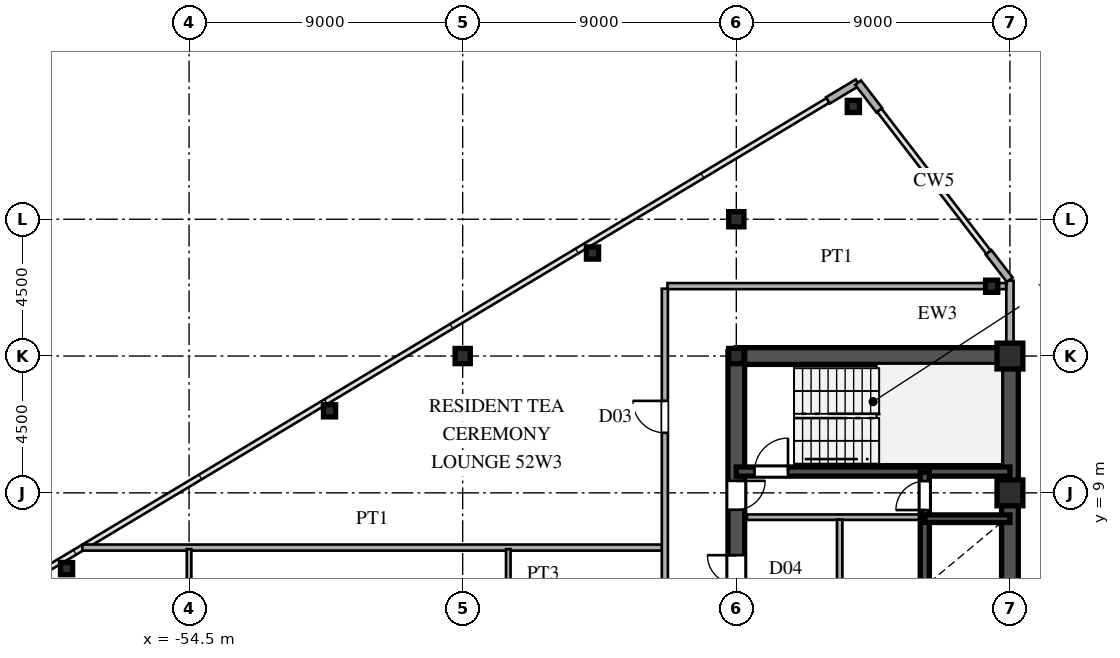
"""IFC4 building model, lengths in metres.
Left out: names, types, materials, properties, quantities, classifications, styles, units other than length and angle.
Written with IfcOpenShell. Run it as: python <this file> out.ifc"""

import sys

from ifc_helpers import new_model, si_unit, direction, frame, frame_2d, origin, origin_2d, place, context, subcontext, project, spatial, rectangle, hollow_rectangle, i_section, extrude, source, transform, mapped, element, fill, save


model = new_model("IFC4")
c1 = context("Model", 3, precision=1e-05, world=origin(), true_north=direction((0.0, 1.0)))
c2 = subcontext(c1, "Body", "Model", "MODEL_VIEW")
j1 = project(units=[si_unit("LENGTHUNIT", "METRE"), si_unit("PLANEANGLEUNIT", "RADIAN")], contexts=[c1])
p1 = place(None, origin())
s1 = spatial("IfcSite", under=j1, at=p1, CompositionType="ELEMENT")
p2 = place(p1, origin())
s2 = spatial("IfcBuilding", under=s1, at=p2, CompositionType="ELEMENT")
p3 = place(p2, frame((0.0, 0.0, 195.9)))
s3 = spatial("IfcBuildingStorey", under=s2, at=p3, CompositionType="ELEMENT", Elevation=195.9)
m1 = source(origin(), c2, "Body", "SweptSolid", [
    extrude(hollow_rectangle(XDim=0.85, YDim=0.85, WallThickness=0.036, at=origin_2d()), origin(), (0.0, 0.0, 1.0), 3.6),
])
for number, where, z_axis, x_axis in (
    (1, (-27.5, 9.0, 0.0), (0.0, 0.0, 1.0), (1.0, 0.0, 0.0)),
    (2, (-27.5, 13.5, 0.0), (0.0, 0.0, 1.0), (1.0, 0.0, 0.0)),
):
    element("IfcColumn", number, at=place(p3, frame(where, z_axis=z_axis, x_axis=x_axis)), inside=s3, PredefinedType="COLUMN", context=c2, shape_type="MappedRepresentation", body=[
        mapped(m1, transform((0.0, 0.0, 0.0), scale=1.0)),
    ])
m2 = source(origin(), c2, "Body", "SweptSolid", [
    extrude(i_section(OverallWidth=0.5, OverallDepth=0.5, WebThickness=0.02, FlangeThickness=0.032, at=origin_2d()), origin(), (0.0, 0.0, 1.0), 3.6),
])
for number, where, z_axis, x_axis in (
    (3, (-36.5, 13.5, 0.0), (0.0, 0.0, 1.0), (1.0, 0.0, 0.0)),
    (4, (-36.5, 18.0, 0.0), (0.0, 0.0, 1.0), (1.0, 0.0, 0.0)),
    (5, (-45.5, 13.5, 0.0), (0.0, 0.0, 1.0), (1.0, 0.0, 0.0)),
):
    element("IfcColumn", number, at=place(p3, frame(where, z_axis=z_axis, x_axis=x_axis)), inside=s3, PredefinedType="COLUMN", context=c2, shape_type="MappedRepresentation", body=[
        mapped(m2, transform((0.0, 0.0, 0.0), scale=1.0)),
    ])
m3 = source(origin(), c2, "Body", "SweptSolid", [
    extrude(hollow_rectangle(XDim=0.4, YDim=0.4, WallThickness=0.016, at=origin_2d()), origin(), (0.0, 0.0, 1.0), 3.6),
])
for number, where, z_axis, x_axis in (
    (6, (-28.1, 15.796, 0.0), (0.0, 0.0, 1.0), (1.0, 0.0, 0.0)),
    (7, (-32.65, 21.71, 0.0), (0.0, 0.0, 1.0), (1.0, 0.0, 0.0)),
    (8, (-41.23, 16.889, 0.0), (0.0, 0.0, 1.0), (1.0, 0.0, 0.0)),
    (9, (-49.88, 11.699, 0.0), (0.0, 0.0, 1.0), (1.0, 0.0, 0.0)),
    (10, (-58.53, 6.509, 0.0), (0.0, 0.0, 1.0), (1.0, 0.0, 0.0)),
):
    element("IfcColumn", number, at=place(p3, frame(where, z_axis=z_axis, x_axis=x_axis)), inside=s3, PredefinedType="COLUMN", context=c2, shape_type="MappedRepresentation", body=[
        mapped(m3, transform((0.0, 0.0, 0.0), scale=1.0)),
    ])
p4 = place(p3, frame((-27.5, 13.78, 0.0), z_axis=(0.0, 0.0, 1.0), x_axis=(0.0, 1.0, 0.0)))
e11 = element("IfcWall", 11, at=p4, inside=s3, PredefinedType="SOLIDWALL", context=c2, shape_type="SweptSolid", body=[
    extrude(rectangle(XDim=0.6, YDim=0.24, at=frame_2d((0.3, 0.0))), origin(), (0.0, 0.0, 1.0), 2.88),
])
p5 = place(p3, frame((-27.5, 14.38, 0.0), z_axis=(0.0, 0.0, 1.0), x_axis=(0.0, 1.0, 0.0)))
e12 = element("IfcWall", 12, at=p5, inside=s3, PredefinedType="SOLIDWALL", context=c2, shape_type="SweptSolid", body=[
    extrude(rectangle(XDim=1.6, YDim=0.24, at=frame_2d((0.8, 0.0))), origin(), (0.0, 0.0, 1.0), 3.38),
])
for number, where, z_axis, x_axis in (
    (13, (-27.506, 16.008, 0.0), (0.0, 0.0, 1.0), (-0.61, 0.793, 0.0)),
    (14, (-31.799, 21.588, 0.0), (0.0, 0.0, 1.0), (-0.61, 0.793, 0.0)),
    (15, (-32.509, 22.495, 0.0), (0.0, 0.0, 1.0), (-0.857, -0.515, 0.0)),
):
    element("IfcWall", number, at=place(p3, frame(where, z_axis=z_axis, x_axis=x_axis)), inside=s3, PredefinedType="SOLIDWALL", context=c2, shape_type="SweptSolid", body=[
        extrude(rectangle(XDim=1.14, YDim=0.24, at=frame_2d((0.57, 0.0))), origin(), (0.0, 0.0, 1.0), 3.38),
    ])
p6 = place(p3, frame((-27.5, 1.3, 0.0), z_axis=(0.0, 0.0, 1.0), x_axis=(0.0, 1.0, 0.0)))
e16 = element("IfcWall", 16, at=p6, inside=s3, PredefinedType="SHEAR", context=c2, shape_type="SweptSolid", body=[
    extrude(rectangle(XDim=12.2, YDim=0.55, at=frame_2d((6.1, 0.0))), origin(), (0.0, 0.0, 1.0), 3.38),
])
p7 = place(p3, frame((-36.5, 13.5, 0.0), z_axis=(0.0, 0.0, 1.0), x_axis=(1.0, 0.0, 0.0)))
e17 = element("IfcWall", 17, at=p7, inside=s3, PredefinedType="SHEAR", context=c2, shape_type="SweptSolid", body=[
    extrude(rectangle(XDim=9.0, YDim=0.55, at=frame_2d((4.5, 0.0))), origin(), (0.0, 0.0, 1.0), 3.38),
])
p8 = place(p3, frame((-36.5, 8.2, 0.0), z_axis=(0.0, 0.0, 1.0), x_axis=(0.0, 1.0, 0.0)))
e18 = element("IfcWall", 18, at=p8, inside=s3, PredefinedType="SHEAR", context=c2, shape_type="SweptSolid", body=[
    extrude(rectangle(XDim=5.45, YDim=0.55, at=frame_2d((2.725, 0.0))), origin(), (0.0, 0.0, 1.0), 3.38),
])
p9 = place(p8, frame((0.245, 0.0, 0.0)))
e19 = element("IfcOpeningElement", 19, at=p9, cuts=e18, PredefinedType="OPENING", context=c2, shape_type="SweptSolid", body=[
    extrude(rectangle(XDim=0.95, YDim=2.15, at=frame_2d((0.475, 1.075))), frame((0.0, 0.285, 0.0), z_axis=(0.0, -1.0, 0.0), x_axis=(1.0, 0.0, 0.0)), (0.0, 0.0, 1.0), 0.57),
])
p10 = place(p3, frame((-36.5, 4.75, 0.0), z_axis=(0.0, 0.0, 1.0), x_axis=(0.0, 1.0, 0.0)))
e20 = element("IfcWall", 20, at=p10, inside=s3, PredefinedType="SHEAR", context=c2, shape_type="SweptSolid", body=[
    extrude(rectangle(XDim=3.45, YDim=0.55, at=frame_2d((1.725, 0.0))), origin(), (0.0, 0.0, 1.0), 3.38),
])
p11 = place(p10, frame((1.25, 0.0, 0.0)))
e21 = element("IfcOpeningElement", 21, at=p11, cuts=e20, PredefinedType="OPENING", context=c2, shape_type="SweptSolid", body=[
    extrude(rectangle(XDim=0.95, YDim=2.15, at=frame_2d((0.475, 1.075))), frame((0.0, 0.285, 0.0), z_axis=(0.0, -1.0, 0.0), x_axis=(1.0, 0.0, 0.0)), (0.0, 0.0, 1.0), 0.57),
])
p12 = place(p3, frame((-36.5, 9.7, 0.0), z_axis=(0.0, 0.0, 1.0), x_axis=(1.0, 0.0, 0.0)))
e22 = element("IfcWall", 22, at=p12, inside=s3, PredefinedType="SHEAR", context=c2, shape_type="SweptSolid", body=[
    extrude(rectangle(XDim=9.0, YDim=0.3, at=frame_2d((4.5, 0.0))), origin(), (0.0, 0.0, 1.0), 3.38),
])
p13 = place(p12, frame((0.6, 0.0, 0.0)))
e23 = element("IfcOpeningElement", 23, at=p13, cuts=e22, PredefinedType="OPENING", context=c2, shape_type="SweptSolid", body=[
    extrude(rectangle(XDim=1.1, YDim=2.2, at=frame_2d((0.55, 1.1))), frame((0.0, 0.16, 0.0), z_axis=(0.0, -1.0, 0.0), x_axis=(1.0, 0.0, 0.0)), (0.0, 0.0, 1.0), 0.32),
])
p14 = place(p3, frame((-30.3, 8.15, 0.0), z_axis=(0.0, 0.0, 1.0), x_axis=(1.0, 0.0, 0.0)))
e24 = element("IfcWall", 24, at=p14, inside=s3, PredefinedType="SHEAR", context=c2, shape_type="SweptSolid", body=[
    extrude(rectangle(XDim=2.8, YDim=0.25, at=frame_2d((1.4, 0.0))), origin(), (0.0, 0.0, 1.0), 3.38),
])
p15 = place(p3, frame((-30.3, 5.9, 0.0), z_axis=(0.0, 0.0, 1.0), x_axis=(0.0, 1.0, 0.0)))
e25 = element("IfcWall", 25, at=p15, inside=s3, PredefinedType="SHEAR", context=c2, shape_type="SweptSolid", body=[
    extrude(rectangle(XDim=2.25, YDim=0.3, at=frame_2d((1.125, 0.0))), origin(), (0.0, 0.0, 1.0), 3.38),
])
p16 = place(p3, frame((-30.3, 8.15, 0.0), z_axis=(0.0, 0.0, 1.0), x_axis=(0.0, 1.0, 0.0)))
e26 = element("IfcWall", 26, at=p16, inside=s3, PredefinedType="SHEAR", context=c2, shape_type="SweptSolid", body=[
    extrude(rectangle(XDim=1.53, YDim=0.3, at=frame_2d((0.765, 0.0))), origin(), (0.0, 0.0, 1.0), 3.38),
])
p17 = place(p16, frame((0.285, 0.0, 0.0)))
e27 = element("IfcOpeningElement", 27, at=p17, cuts=e26, PredefinedType="OPENING", context=c2, shape_type="SweptSolid", body=[
    extrude(rectangle(XDim=0.95, YDim=2.15, at=frame_2d((0.475, 1.075))), frame((0.0, 0.16, 0.0), z_axis=(0.0, -1.0, 0.0), x_axis=(1.0, 0.0, 0.0)), (0.0, 0.0, 1.0), 0.32),
])
p18 = place(p3, frame((-36.15, 8.2, 0.0), z_axis=(0.0, 0.0, 1.0), x_axis=(1.0, 0.0, 0.0)))
e28 = element("IfcWall", 28, at=p18, inside=s3, PredefinedType="PARTITIONING", context=c2, shape_type="SweptSolid", body=[
    extrude(rectangle(XDim=5.7, YDim=0.18, at=frame_2d((2.85, 0.0))), origin(), (0.0, 0.0, 1.0), 3.38),
])
p19 = place(p3, frame((-33.1, 1.38, 0.0), z_axis=(0.0, 0.0, 1.0), x_axis=(0.0, 1.0, 0.0)))
e29 = element("IfcWall", 29, at=p19, inside=s3, PredefinedType="PARTITIONING", context=c2, shape_type="SweptSolid", body=[
    extrude(rectangle(XDim=6.74, YDim=0.18, at=frame_2d((3.37, 0.0))), origin(), (0.0, 0.0, 1.0), 3.38),
])
p20 = place(p3, frame((-58.01, 7.2, 0.0), z_axis=(0.0, 0.0, 1.0), x_axis=(1.0, 0.0, 0.0)))
e30 = element("IfcWall", 30, at=p20, inside=s3, PredefinedType="PARTITIONING", context=c2, shape_type="SweptSolid", body=[
    extrude(rectangle(XDim=19.08, YDim=0.2, at=frame_2d((9.54, 0.0))), origin(), (0.0, 0.0, 1.0), 3.38),
])
p21 = place(p3, frame((-38.765, 15.8, 0.0), z_axis=(0.0, 0.0, 1.0), x_axis=(1.0, 0.0, 0.0)))
e31 = element("IfcWall", 31, at=p21, inside=s3, PredefinedType="PARTITIONING", context=c2, shape_type="SweptSolid", body=[
    extrude(rectangle(XDim=11.14, YDim=0.2, at=frame_2d((5.57, 0.0))), origin(), (0.0, 0.0, 1.0), 3.38),
])
p22 = place(p3, frame((-54.5, -6.15, 0.0), z_axis=(0.0, 0.0, 1.0), x_axis=(0.0, 1.0, 0.0)))
e32 = element("IfcWall", 32, at=p22, inside=s3, PredefinedType="PARTITIONING", context=c2, shape_type="SweptSolid", body=[
    extrude(rectangle(XDim=13.3, YDim=0.15, at=frame_2d((6.65, 0.0))), origin(), (0.0, 0.0, 1.0), 2.78),
])
p23 = place(p22, frame((6.175, 0.0, 0.0)))
e33 = element("IfcOpeningElement", 33, at=p23, cuts=e32, PredefinedType="OPENING", context=c2, shape_type="SweptSolid", body=[
    extrude(rectangle(XDim=0.95, YDim=2.15, at=frame_2d((0.475, 1.075))), frame((0.0, 0.085, 0.0), z_axis=(0.0, -1.0, 0.0), x_axis=(1.0, 0.0, 0.0)), (0.0, 0.0, 1.0), 0.17),
])
p24 = place(p3, frame((-44.0, 3.232, 0.0), z_axis=(0.0, 0.0, 1.0), x_axis=(0.0, 1.0, 0.0)))
e34 = element("IfcWall", 34, at=p24, inside=s3, PredefinedType="PARTITIONING", context=c2, shape_type="SweptSolid", body=[
    extrude(rectangle(XDim=3.918, YDim=0.15, at=frame_2d((1.959, 0.0))), origin(), (0.0, 0.0, 1.0), 3.38),
])
p25 = place(p3, frame((-38.85, -15.715, 0.0), z_axis=(0.0, 0.0, 1.0), x_axis=(0.0, 1.0, 0.0)))
e35 = element("IfcWall", 35, at=p25, inside=s3, PredefinedType="PARTITIONING", context=c2, shape_type="SweptSolid", body=[
    extrude(rectangle(XDim=31.43, YDim=0.2, at=frame_2d((15.715, 0.0))), origin(), (0.0, 0.0, 1.0), 3.38),
])
p26 = place(p25, frame((7.593, 0.0, 0.0)))
e36 = element("IfcOpeningElement", 36, at=p26, cuts=e35, PredefinedType="OPENING", context=c2, shape_type="SweptSolid", body=[
    extrude(rectangle(XDim=1.05, YDim=2.25, at=frame_2d((0.525, 1.125))), frame((0.0, 0.11, 0.0), z_axis=(0.0, -1.0, 0.0), x_axis=(1.0, 0.0, 0.0)), (0.0, 0.0, 1.0), 0.22),
])
p27 = place(p25, frame((15.489, 0.0, 0.0)))
e37 = element("IfcOpeningElement", 37, at=p27, cuts=e35, PredefinedType="OPENING", context=c2, shape_type="SweptSolid", body=[
    extrude(rectangle(XDim=1.05, YDim=2.25, at=frame_2d((0.525, 1.125))), frame((0.0, 0.11, 0.0), z_axis=(0.0, -1.0, 0.0), x_axis=(1.0, 0.0, 0.0)), (0.0, 0.0, 1.0), 0.22),
])
p28 = place(p25, frame((26.69, 0.0, 0.0)))
e38 = element("IfcOpeningElement", 38, at=p28, cuts=e35, PredefinedType="OPENING", context=c2, shape_type="SweptSolid", body=[
    extrude(rectangle(XDim=1.05, YDim=2.25, at=frame_2d((0.525, 1.125))), frame((0.0, 0.11, 0.0), z_axis=(0.0, -1.0, 0.0), x_axis=(1.0, 0.0, 0.0)), (0.0, 0.0, 1.0), 0.22),
])
m4 = source(origin(), c2, "Body", "SweptSolid", [
    extrude(rectangle(XDim=0.95, YDim=2.15, at=frame_2d((0.475, 1.075))), frame((0.0, 0.025, 0.0), z_axis=(0.0, -1.0, 0.0), x_axis=(1.0, 0.0, 0.0)), (0.0, 0.0, 1.0), 0.05),
])
p29 = place(p9, frame((0.95, 0.0, 0.0), z_axis=(0.0, 0.0, 1.0), x_axis=(-1.0, 0.0, 0.0)))
e39 = element("IfcDoor", 39, at=p29, inside=s3, OperationType="SINGLE_SWING_RIGHT", PredefinedType="DOOR", context=c2, shape_type="MappedRepresentation", body=[
    mapped(m4, transform((0.0, 0.0, 0.0), scale=1.0)),
])
fill(e19, e39)
p30 = place(p11, origin())
e40 = element("IfcDoor", 40, at=p30, inside=s3, OperationType="SINGLE_SWING_RIGHT", PredefinedType="DOOR", context=c2, shape_type="MappedRepresentation", body=[
    mapped(m4, transform((0.0, 0.0, 0.0), scale=1.0)),
])
fill(e21, e40)
m5 = source(origin(), c2, "Body", "SweptSolid", [
    extrude(rectangle(XDim=1.1, YDim=2.2, at=frame_2d((0.55, 1.1))), frame((0.0, 0.025, 0.0), z_axis=(0.0, -1.0, 0.0), x_axis=(1.0, 0.0, 0.0)), (0.0, 0.0, 1.0), 0.05),
])
p31 = place(p13, origin())
e41 = element("IfcDoor", 41, at=p31, inside=s3, OperationType="SINGLE_SWING_RIGHT", PredefinedType="DOOR", context=c2, shape_type="MappedRepresentation", body=[
    mapped(m5, transform((0.0, 0.0, 0.0), scale=1.0)),
])
fill(e23, e41)
p32 = place(p17, origin())
e42 = element("IfcDoor", 42, at=p32, inside=s3, OperationType="SINGLE_SWING_LEFT", PredefinedType="DOOR", context=c2, shape_type="MappedRepresentation", body=[
    mapped(m4, transform((0.0, 0.0, 0.0), scale=1.0)),
])
fill(e27, e42)
m6 = source(origin(), c2, "Body", "SweptSolid", [
    extrude(rectangle(XDim=1.05, YDim=2.25, at=frame_2d((0.525, 1.125))), frame((0.0, 0.025, 0.0), z_axis=(0.0, -1.0, 0.0), x_axis=(1.0, 0.0, 0.0)), (0.0, 0.0, 1.0), 0.05),
])
p33 = place(p28, origin())
e43 = element("IfcDoor", 43, at=p33, inside=s3, OperationType="SINGLE_SWING_RIGHT", PredefinedType="DOOR", context=c2, shape_type="MappedRepresentation", body=[
    mapped(m6, transform((0.0, 0.0, 0.0), scale=1.0)),
])
fill(e38, e43)
save(model, sys.argv[1])
